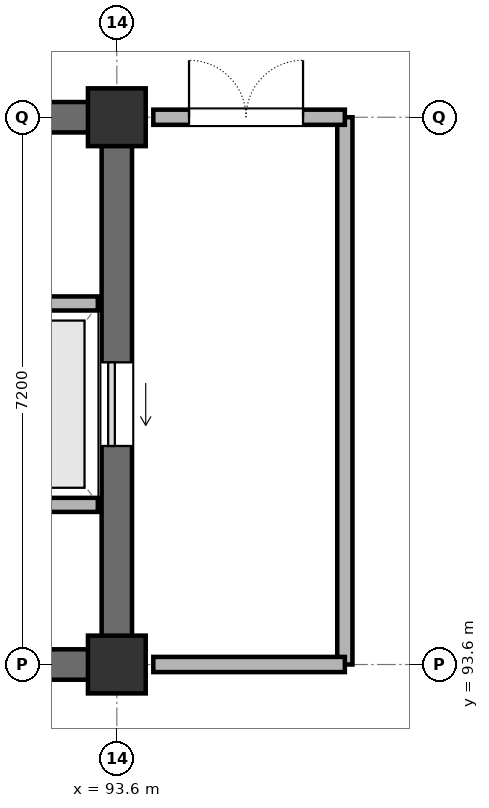
"""IFC4 building model, lengths in metres.
Left out: names, types, materials, properties, quantities, classifications, styles, units other than length and angle.
Written with IfcOpenShell. Run it as: python <this file> out.ifc"""

import sys

from ifc_helpers import new_model, si_unit, direction, frame, frame_2d, origin, origin_2d, place, context, subcontext, project, spatial, rectangle, extrude, element, fill, save


model = new_model("IFC4")
c1 = context("Model", 3, precision=1e-05, world=origin(), true_north=direction((0.0, 1.0)))
c2 = subcontext(c1, "Body", "Model", "MODEL_VIEW")
j1 = project(units=[si_unit("LENGTHUNIT", "METRE"), si_unit("PLANEANGLEUNIT", "RADIAN")], contexts=[c1])
p1 = place(None, origin())
s1 = spatial("IfcSite", under=j1, at=p1, CompositionType="ELEMENT")
p2 = place(p1, origin())
s2 = spatial("IfcBuilding", under=s1, at=p2, CompositionType="ELEMENT")
p3 = place(p2, frame((0.0, 0.0, 18.6)))
s3 = spatial("IfcBuildingStorey", under=s2, at=p3, CompositionType="ELEMENT", Elevation=18.6)
for number, where, z_axis, x_axis in (
    (1, (93.6, 93.6, 0.0), (0.0, 0.0, 1.0), (1.0, 0.0, 0.0)),
    (2, (93.6, 100.8, 0.0), (0.0, 0.0, 1.0), (1.0, 0.0, 0.0)),
):
    element("IfcColumn", number, at=place(p3, frame(where, z_axis=z_axis, x_axis=x_axis)), inside=s3, PredefinedType="COLUMN", context=c2, shape_type="SweptSolid", body=[
        extrude(rectangle(XDim=0.76, YDim=0.76, at=origin_2d()), origin(), (0.0, 0.0, 1.0), 3.9),
    ])
p4 = place(p3, frame((86.75, 93.6, 0.0), z_axis=(0.0, 0.0, 1.0), x_axis=(1.0, 0.0, 0.0)))
e3 = element("IfcWall", 3, at=p4, inside=s3, PredefinedType="SHEAR", context=c2, shape_type="SweptSolid", body=[
    extrude(rectangle(XDim=6.5, YDim=0.4, at=frame_2d((3.25, 0.0))), origin(), (0.0, 0.0, 1.0), 3.9),
])
p5 = place(p3, frame((93.6, 93.95, 0.0), z_axis=(0.0, 0.0, 1.0), x_axis=(0.0, 1.0, 0.0)))
e4 = element("IfcWall", 4, at=p5, inside=s3, PredefinedType="SHEAR", context=c2, shape_type="SweptSolid", body=[
    extrude(rectangle(XDim=6.5, YDim=0.4, at=frame_2d((3.25, 0.0))), origin(), (0.0, 0.0, 1.0), 3.9),
])
p6 = place(p5, frame((2.525, 0.0, 0.0)))
e5 = element("IfcOpeningElement", 5, at=p6, cuts=e4, PredefinedType="OPENING", context=c2, shape_type="SweptSolid", body=[
    extrude(rectangle(XDim=1.1, YDim=2.2, at=frame_2d((0.55, 1.1))), frame((0.0, 0.21, 0.0), z_axis=(0.0, -1.0, 0.0), x_axis=(1.0, 0.0, 0.0)), (0.0, 0.0, 1.0), 0.42),
])
p7 = place(p3, frame((93.25, 100.8, 0.0), z_axis=(0.0, 0.0, 1.0), x_axis=(-1.0, 0.0, 0.0)))
e6 = element("IfcWall", 6, at=p7, inside=s3, PredefinedType="SHEAR", context=c2, shape_type="SweptSolid", body=[
    extrude(rectangle(XDim=6.5, YDim=0.4, at=frame_2d((3.25, 0.0))), origin(), (0.0, 0.0, 1.0), 3.9),
])
p8 = place(p7, frame((3.6, 0.0, 0.0)))
e7 = element("IfcOpeningElement", 7, at=p8, cuts=e6, PredefinedType="OPENING", context=c2, shape_type="SweptSolid", body=[
    extrude(rectangle(XDim=1.2, YDim=2.2, at=frame_2d((0.6, 1.1))), frame((0.0, 0.21, 0.0), z_axis=(0.0, -1.0, 0.0), x_axis=(1.0, 0.0, 0.0)), (0.0, 0.0, 1.0), 0.42),
])
for number, where, z_axis, x_axis in (
    (8, (91.25, 95.7, 0.0), (0.0, 0.0, 1.0), (1.0, 0.0, 0.0)),
    (9, (91.25, 98.35, 0.0), (0.0, 0.0, 1.0), (1.0, 0.0, 0.0)),
):
    element("IfcWall", number, at=place(p3, frame(where, z_axis=z_axis, x_axis=x_axis)), inside=s3, PredefinedType="PARTITIONING", context=c2, shape_type="SweptSolid", body=[
        extrude(rectangle(XDim=2.1, YDim=0.185, at=frame_2d((1.05, 0.0))), origin(), (0.0, 0.0, 1.0), 3.9),
    ])
p9 = place(p3, frame((96.6, 93.6, 0.0), z_axis=(0.0, 0.0, 1.0), x_axis=(0.0, 1.0, 0.0)))
e10 = element("IfcWall", 10, at=p9, inside=s3, PredefinedType="PARTITIONING", context=c2, shape_type="SweptSolid", body=[
    extrude(rectangle(XDim=7.2, YDim=0.2, at=frame_2d((3.6, 0.0))), origin(), (0.0, 0.0, 1.0), 2.78),
])
p10 = place(p3, frame((94.08, 93.6, 0.0), z_axis=(0.0, 0.0, 1.0), x_axis=(1.0, 0.0, 0.0)))
e11 = element("IfcWall", 11, at=p10, inside=s3, PredefinedType="PARTITIONING", context=c2, shape_type="SweptSolid", body=[
    extrude(rectangle(XDim=2.52, YDim=0.2, at=frame_2d((1.26, 0.0))), origin(), (0.0, 0.0, 1.0), 2.78),
])
p11 = place(p3, frame((96.6, 100.8, 0.0), z_axis=(0.0, 0.0, 1.0), x_axis=(-1.0, 0.0, 0.0)))
e12 = element("IfcWall", 12, at=p11, inside=s3, PredefinedType="PARTITIONING", context=c2, shape_type="SweptSolid", body=[
    extrude(rectangle(XDim=2.52, YDim=0.2, at=frame_2d((1.26, 0.0))), origin(), (0.0, 0.0, 1.0), 2.78),
])
p12 = place(p11, frame((0.55, 0.0, 0.0)))
e13 = element("IfcOpeningElement", 13, at=p12, cuts=e12, PredefinedType="OPENING", context=c2, shape_type="SweptSolid", body=[
    extrude(rectangle(XDim=1.5, YDim=2.2, at=frame_2d((0.75, 1.1))), frame((0.0, 0.11, 0.0), z_axis=(0.0, -1.0, 0.0), x_axis=(1.0, 0.0, 0.0)), (0.0, 0.0, 1.0), 0.22),
])
p13 = place(p6, origin())
e14 = element("IfcDoor", 14, at=p13, inside=s3, OperationType="SLIDING_TO_LEFT", PredefinedType="DOOR", context=c2, shape_type="SweptSolid", body=[
    extrude(rectangle(XDim=1.1, YDim=2.2, at=frame_2d((0.55, 1.1))), frame((0.0, 0.025, 0.0), z_axis=(0.0, -1.0, 0.0), x_axis=(1.0, 0.0, 0.0)), (0.0, 0.0, 1.0), 0.05),
])
fill(e5, e14)
p14 = place(p12, frame((1.5, 0.0, 0.0), z_axis=(0.0, 0.0, 1.0), x_axis=(-1.0, 0.0, 0.0)))
e15 = element("IfcDoor", 15, at=p14, inside=s3, OperationType="DOUBLE_DOOR_SINGLE_SWING", PredefinedType="DOOR", context=c2, shape_type="SweptSolid", body=[
    extrude(rectangle(XDim=1.5, YDim=2.2, at=frame_2d((0.75, 1.1))), frame((0.0, 0.025, 0.0), z_axis=(0.0, -1.0, 0.0), x_axis=(1.0, 0.0, 0.0)), (0.0, 0.0, 1.0), 0.05),
])
fill(e13, e15)
save(model, sys.argv[1])
